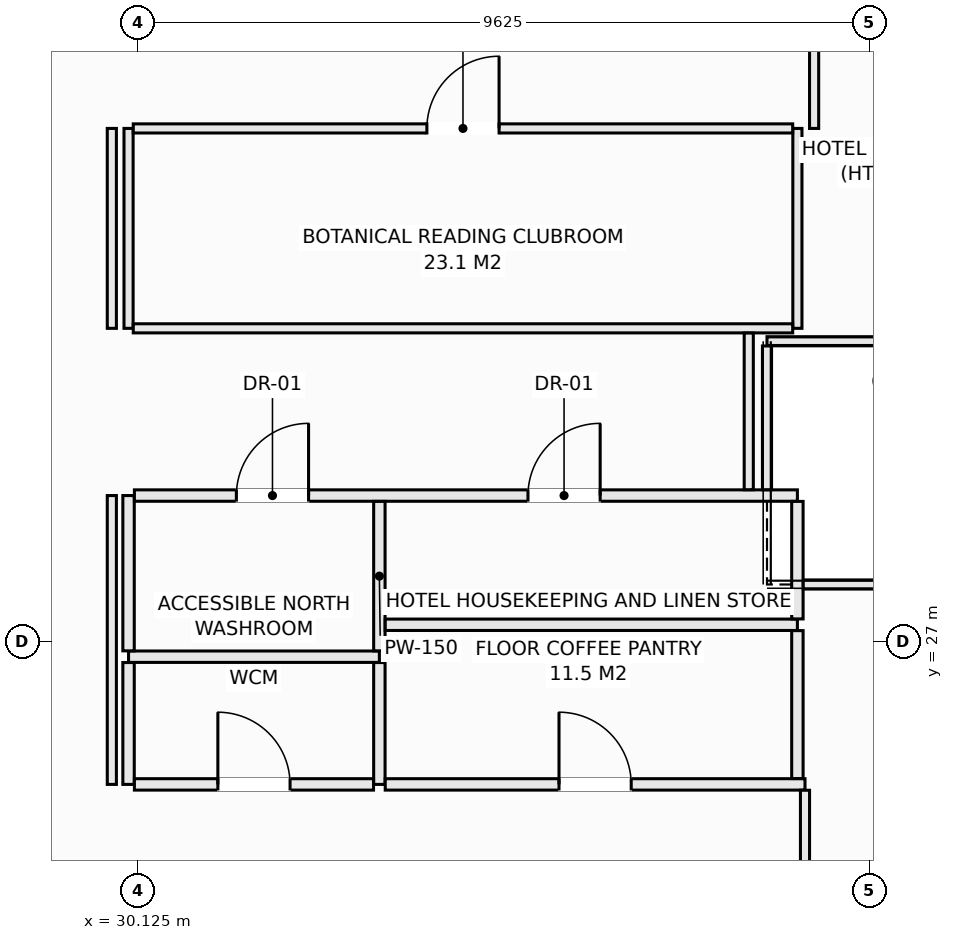
"""IFC4 building model, lengths in metres.
Left out: names, types, materials, properties, quantities, classifications, styles, units other than length and angle.
Written with IfcOpenShell. Run it as: python <this file> out.ifc"""

import sys

from ifc_helpers import new_model, si_unit, direction, frame, frame_2d, origin, place, context, subcontext, project, spatial, rectangle, extrude, element, fill, save


model = new_model("IFC4")
c1 = context("Model", 3, precision=1e-05, world=origin(), true_north=direction((0.0, 1.0)))
c2 = subcontext(c1, "Body", "Model", "MODEL_VIEW")
j1 = project(units=[si_unit("LENGTHUNIT", "METRE"), si_unit("PLANEANGLEUNIT", "RADIAN")], contexts=[c1])
p1 = place(None, origin())
s1 = spatial("IfcSite", under=j1, at=p1, CompositionType="ELEMENT")
p2 = place(p1, origin())
s2 = spatial("IfcBuilding", under=s1, at=p2, CompositionType="ELEMENT")
p3 = place(p2, frame((0.0, 0.0, 122.3)))
s3 = spatial("IfcBuildingStorey", under=s2, at=p3, CompositionType="ELEMENT", Elevation=122.3)
p4 = place(p3, frame((30.0, 26.8, 0.0), z_axis=(0.0, 0.0, 1.0), x_axis=(1.0, 0.0, 0.0)))
e1 = element("IfcWall", 1, at=p4, inside=s3, PredefinedType="PARTITIONING", context=c2, shape_type="SweptSolid", body=[
    extrude(rectangle(XDim=3.3, YDim=0.15, at=frame_2d((1.65, 0.0))), origin(), (0.0, 0.0, 1.0), 3.13),
])
p5 = place(p3, frame((30.0, 25.12, 0.0), z_axis=(0.0, 0.0, 1.0), x_axis=(0.0, 1.0, 0.0)))
e2 = element("IfcWall", 2, at=p5, inside=s3, PredefinedType="PARTITIONING", context=c2, shape_type="SweptSolid", body=[
    extrude(rectangle(XDim=1.603, YDim=0.15, at=frame_2d((0.801, 0.0))), origin(), (0.0, 0.0, 1.0), 3.13),
])
p6 = place(p3, frame((30.0, 26.877, 0.0), z_axis=(0.0, 0.0, 1.0), x_axis=(0.0, 1.0, 0.0)))
e3 = element("IfcWall", 3, at=p6, inside=s3, PredefinedType="PARTITIONING", context=c2, shape_type="SweptSolid", body=[
    extrude(rectangle(XDim=2.043, YDim=0.15, at=frame_2d((1.021, 0.0))), origin(), (0.0, 0.0, 1.0), 3.13),
])
p7 = place(p3, frame((30.0, 31.12, 0.0), z_axis=(0.0, 0.0, 1.0), x_axis=(0.0, 1.0, 0.0)))
e4 = element("IfcWall", 4, at=p7, inside=s3, PredefinedType="PARTITIONING", context=c2, shape_type="SweptSolid", body=[
    extrude(rectangle(XDim=2.63, YDim=0.12, at=frame_2d((1.315, 0.0))), origin(), (0.0, 0.0, 1.0), 3.13),
])
p8 = place(p3, frame((30.077, 28.92, 0.0), z_axis=(0.0, 0.0, 1.0), x_axis=(1.0, 0.0, 0.0)))
e5 = element("IfcWall", 5, at=p8, inside=s3, PredefinedType="PARTITIONING", context=c2, shape_type="SweptSolid", body=[
    extrude(rectangle(XDim=8.723, YDim=0.15, at=frame_2d((4.362, 0.0))), origin(), (0.0, 0.0, 1.0), 3.13),
])
p9 = place(p8, frame((1.342, 0.0, 0.0)))
e6 = element("IfcOpeningElement", 6, at=p9, cuts=e5, PredefinedType="OPENING", context=c2, shape_type="SweptSolid", body=[
    extrude(rectangle(XDim=0.95, YDim=2.1, at=frame_2d((0.475, 1.05))), frame((0.0, 0.085, 0.0), z_axis=(0.0, -1.0, 0.0), x_axis=(1.0, 0.0, 0.0)), (0.0, 0.0, 1.0), 0.17),
])
p10 = place(p8, frame((5.178, 0.0, 0.0)))
e7 = element("IfcOpeningElement", 7, at=p10, cuts=e5, PredefinedType="OPENING", context=c2, shape_type="SweptSolid", body=[
    extrude(rectangle(XDim=0.95, YDim=2.1, at=frame_2d((0.475, 1.05))), frame((0.0, 0.085, 0.0), z_axis=(0.0, -1.0, 0.0), x_axis=(1.0, 0.0, 0.0)), (0.0, 0.0, 1.0), 0.17),
])
p11 = place(p3, frame((33.3, 25.12, 0.0), z_axis=(0.0, 0.0, 1.0), x_axis=(0.0, 1.0, 0.0)))
e8 = element("IfcWall", 8, at=p11, inside=s3, PredefinedType="PARTITIONING", context=c2, shape_type="SweptSolid", body=[
    extrude(rectangle(XDim=1.603, YDim=0.15, at=frame_2d((0.801, 0.0))), origin(), (0.0, 0.0, 1.0), 3.13),
])
p12 = place(p3, frame((33.3, 26.877, 0.0), z_axis=(0.0, 0.0, 1.0), x_axis=(0.0, 1.0, 0.0)))
e9 = element("IfcWall", 9, at=p12, inside=s3, PredefinedType="PARTITIONING", context=c2, shape_type="SweptSolid", body=[
    extrude(rectangle(XDim=1.966, YDim=0.15, at=frame_2d((0.983, 0.0))), origin(), (0.0, 0.0, 1.0), 3.13),
])
p13 = place(p3, frame((30.077, 25.12, 0.0), z_axis=(0.0, 0.0, 1.0), x_axis=(1.0, 0.0, 0.0)))
e10 = element("IfcWall", 10, at=p13, inside=s3, PredefinedType="PARTITIONING", context=c2, shape_type="SweptSolid", body=[
    extrude(rectangle(XDim=3.146, YDim=0.15, at=frame_2d((1.573, 0.0))), origin(), (0.0, 0.0, 1.0), 3.13),
])
p14 = place(p13, frame((1.098, 0.0, 0.0)))
e11 = element("IfcOpeningElement", 11, at=p14, cuts=e10, PredefinedType="OPENING", context=c2, shape_type="SweptSolid", body=[
    extrude(rectangle(XDim=0.95, YDim=2.1, at=frame_2d((0.475, 1.05))), frame((0.0, 0.085, 0.0), z_axis=(0.0, -1.0, 0.0), x_axis=(1.0, 0.0, 0.0)), (0.0, 0.0, 1.0), 0.17),
])
p15 = place(p3, frame((33.377, 25.12, 0.0), z_axis=(0.0, 0.0, 1.0), x_axis=(1.0, 0.0, 0.0)))
e12 = element("IfcWall", 12, at=p15, inside=s3, PredefinedType="PARTITIONING", context=c2, shape_type="SweptSolid", body=[
    extrude(rectangle(XDim=5.523, YDim=0.15, at=frame_2d((2.761, 0.0))), origin(), (0.0, 0.0, 1.0), 3.13),
])
p16 = place(p15, frame((2.287, 0.0, 0.0)))
e13 = element("IfcOpeningElement", 13, at=p16, cuts=e12, PredefinedType="OPENING", context=c2, shape_type="SweptSolid", body=[
    extrude(rectangle(XDim=0.95, YDim=2.1, at=frame_2d((0.475, 1.05))), frame((0.0, 0.085, 0.0), z_axis=(0.0, -1.0, 0.0), x_axis=(1.0, 0.0, 0.0)), (0.0, 0.0, 1.0), 0.17),
])
p17 = place(p3, frame((33.377, 27.22, 0.0), z_axis=(0.0, 0.0, 1.0), x_axis=(1.0, 0.0, 0.0)))
e14 = element("IfcWall", 14, at=p17, inside=s3, PredefinedType="PARTITIONING", context=c2, shape_type="SweptSolid", body=[
    extrude(rectangle(XDim=5.423, YDim=0.15, at=frame_2d((2.711, 0.0))), origin(), (0.0, 0.0, 1.0), 3.13),
])
p18 = place(p3, frame((38.8, 25.197, 0.0), z_axis=(0.0, 0.0, 1.0), x_axis=(0.0, 1.0, 0.0)))
e15 = element("IfcWall", 15, at=p18, inside=s3, PredefinedType="PARTITIONING", context=c2, shape_type="SweptSolid", body=[
    extrude(rectangle(XDim=1.946, YDim=0.15, at=frame_2d((0.973, 0.0))), origin(), (0.0, 0.0, 1.0), 3.13),
])
p19 = place(p3, frame((38.8, 27.297, 0.0), z_axis=(0.0, 0.0, 1.0), x_axis=(0.0, 1.0, 0.0)))
e16 = element("IfcWall", 16, at=p19, inside=s3, PredefinedType="PARTITIONING", context=c2, shape_type="SweptSolid", body=[
    extrude(rectangle(XDim=1.546, YDim=0.15, at=frame_2d((0.773, 0.0))), origin(), (0.0, 0.0, 1.0), 3.13),
])
p20 = place(p3, frame((38.8, 31.12, 0.0), z_axis=(0.0, 0.0, 1.0), x_axis=(0.0, 1.0, 0.0)))
e17 = element("IfcWall", 17, at=p20, inside=s3, PredefinedType="PARTITIONING", context=c2, shape_type="SweptSolid", body=[
    extrude(rectangle(XDim=2.63, YDim=0.12, at=frame_2d((1.315, 0.0))), origin(), (0.0, 0.0, 1.0), 3.13),
])
p21 = place(p3, frame((30.062, 31.12, 0.0), z_axis=(0.0, 0.0, 1.0), x_axis=(1.0, 0.0, 0.0)))
e18 = element("IfcWall", 18, at=p21, inside=s3, PredefinedType="PARTITIONING", context=c2, shape_type="SweptSolid", body=[
    extrude(rectangle(XDim=8.676, YDim=0.12, at=frame_2d((4.338, 0.0))), origin(), (0.0, 0.0, 1.0), 3.13),
])
p22 = place(p3, frame((30.062, 33.75, 0.0), z_axis=(0.0, 0.0, 1.0), x_axis=(1.0, 0.0, 0.0)))
e19 = element("IfcWall", 19, at=p22, inside=s3, PredefinedType="PARTITIONING", context=c2, shape_type="SweptSolid", body=[
    extrude(rectangle(XDim=8.676, YDim=0.12, at=frame_2d((4.338, 0.0))), origin(), (0.0, 0.0, 1.0), 3.13),
])
p23 = place(p22, frame((3.863, 0.0, 0.0)))
e20 = element("IfcOpeningElement", 20, at=p23, cuts=e19, PredefinedType="OPENING", context=c2, shape_type="SweptSolid", body=[
    extrude(rectangle(XDim=0.95, YDim=2.1, at=frame_2d((0.475, 1.05))), frame((0.0, 0.07, 0.0), z_axis=(0.0, -1.0, 0.0), x_axis=(1.0, 0.0, 0.0)), (0.0, 0.0, 1.0), 0.14),
])
p24 = place(p3, frame((39.02, 33.75, 0.0), z_axis=(0.0, 0.0, 1.0), x_axis=(0.0, 1.0, 0.0)))
e21 = element("IfcWall", 21, at=p24, inside=s3, PredefinedType="PARTITIONING", context=c2, shape_type="SweptSolid", body=[
    extrude(rectangle(XDim=2.0, YDim=0.12, at=frame_2d((1.0, 0.0))), origin(), (0.0, 0.0, 1.0), 3.13),
])
p25 = place(p3, frame((29.78, 25.12, 0.0), z_axis=(0.0, 0.0, 1.0), x_axis=(0.0, 1.0, 0.0)))
e22 = element("IfcWall", 22, at=p25, inside=s3, PredefinedType="PARTITIONING", context=c2, shape_type="SweptSolid", body=[
    extrude(rectangle(XDim=3.8, YDim=0.12, at=frame_2d((1.9, 0.0))), origin(), (0.0, 0.0, 1.0), 3.13),
])
p26 = place(p3, frame((29.78, 31.12, 0.0), z_axis=(0.0, 0.0, 1.0), x_axis=(0.0, 1.0, 0.0)))
e23 = element("IfcWall", 23, at=p26, inside=s3, PredefinedType="PARTITIONING", context=c2, shape_type="SweptSolid", body=[
    extrude(rectangle(XDim=2.63, YDim=0.12, at=frame_2d((1.315, 0.0))), origin(), (0.0, 0.0, 1.0), 3.13),
])
p27 = place(p3, frame((38.16, 28.997, 0.0), z_axis=(0.0, 0.0, 1.0), x_axis=(0.0, 1.0, 0.0)))
e24 = element("IfcWall", 24, at=p27, inside=s3, PredefinedType="PARTITIONING", context=c2, shape_type="SweptSolid", body=[
    extrude(rectangle(XDim=2.061, YDim=0.12, at=frame_2d((1.031, 0.0))), origin(), (0.0, 0.0, 1.0), 3.13),
])
p28 = place(p3, frame((38.9, 23.02, 0.0), z_axis=(0.0, 0.0, 1.0), x_axis=(0.0, 1.0, 0.0)))
e25 = element("IfcWall", 25, at=p28, inside=s3, PredefinedType="PARTITIONING", context=c2, shape_type="SweptSolid", body=[
    extrude(rectangle(XDim=2.023, YDim=0.12, at=frame_2d((1.011, 0.0))), origin(), (0.0, 0.0, 1.0), 3.13),
])
p29 = place(p3, frame((38.877, 27.75, 0.0), z_axis=(0.0, 0.0, 1.0), x_axis=(1.0, 0.0, 0.0)))
e26 = element("IfcWall", 26, at=p29, inside=s3, PredefinedType="PARTITIONING", context=c2, shape_type="SweptSolid", body=[
    extrude(rectangle(XDim=4.923, YDim=0.12, at=frame_2d((2.461, 0.0))), origin(), (0.0, 0.0, 1.0), 3.13),
])
p30 = place(p3, frame((36.468, 40.488, 0.0), z_axis=(0.0, 0.0, 1.0), x_axis=(0.600219452556, -0.799835363543, 0.0)))
e27 = element("IfcWall", 27, at=p30, inside=s3, PredefinedType="PARTITIONING", context=c2, shape_type="SweptSolid", body=[
    extrude(rectangle(XDim=11.925, YDim=0.15, at=frame_2d((5.962, 0.0))), origin(), (0.0, 0.0, 1.0), 3.13),
])
p31 = place(p3, frame((38.4, 30.95, 0.0), z_axis=(0.0, 0.0, 1.0), x_axis=(1.0, 0.0, 0.0)))
e28 = element("IfcWall", 28, at=p31, inside=s3, PredefinedType="PARTITIONING", context=c2, shape_type="SweptSolid", body=[
    extrude(rectangle(XDim=5.129, YDim=0.12, at=frame_2d((2.564, 0.0))), origin(), (0.0, 0.0, 1.0), 3.13),
])
p32 = place(p3, frame((38.4, 28.997, 0.0), z_axis=(0.0, 0.0, 1.0), x_axis=(0.0, 1.0, 0.0)))
e29 = element("IfcWall", 29, at=p32, inside=s3, PredefinedType="PARTITIONING", context=c2, shape_type="SweptSolid", body=[
    extrude(rectangle(XDim=1.891, YDim=0.12, at=frame_2d((0.945, 0.0))), origin(), (0.0, 0.0, 1.0), 3.13),
])
p33 = place(p9, origin())
e30 = element("IfcDoor", 30, at=p33, inside=s3, OperationType="SINGLE_SWING_RIGHT", PredefinedType="DOOR", context=c2, shape_type="SweptSolid", body=[
    extrude(rectangle(XDim=0.95, YDim=2.1, at=frame_2d((0.475, 1.05))), frame((0.0, 0.025, 0.0), z_axis=(0.0, -1.0, 0.0), x_axis=(1.0, 0.0, 0.0)), (0.0, 0.0, 1.0), 0.05),
])
fill(e6, e30)
p34 = place(p14, origin())
e31 = element("IfcDoor", 31, at=p34, inside=s3, OperationType="SINGLE_SWING_LEFT", PredefinedType="DOOR", context=c2, shape_type="SweptSolid", body=[
    extrude(rectangle(XDim=0.95, YDim=2.1, at=frame_2d((0.475, 1.05))), frame((0.0, 0.025, 0.0), z_axis=(0.0, -1.0, 0.0), x_axis=(1.0, 0.0, 0.0)), (0.0, 0.0, 1.0), 0.05),
])
fill(e11, e31)
p35 = place(p10, origin())
e32 = element("IfcDoor", 32, at=p35, inside=s3, OperationType="SINGLE_SWING_RIGHT", PredefinedType="DOOR", context=c2, shape_type="SweptSolid", body=[
    extrude(rectangle(XDim=0.95, YDim=2.1, at=frame_2d((0.475, 1.05))), frame((0.0, 0.025, 0.0), z_axis=(0.0, -1.0, 0.0), x_axis=(1.0, 0.0, 0.0)), (0.0, 0.0, 1.0), 0.05),
])
fill(e7, e32)
p36 = place(p16, origin())
e33 = element("IfcDoor", 33, at=p36, inside=s3, OperationType="SINGLE_SWING_LEFT", PredefinedType="DOOR", context=c2, shape_type="SweptSolid", body=[
    extrude(rectangle(XDim=0.95, YDim=2.1, at=frame_2d((0.475, 1.05))), frame((0.0, 0.025, 0.0), z_axis=(0.0, -1.0, 0.0), x_axis=(1.0, 0.0, 0.0)), (0.0, 0.0, 1.0), 0.05),
])
fill(e13, e33)
p37 = place(p23, origin())
e34 = element("IfcDoor", 34, at=p37, inside=s3, OperationType="SINGLE_SWING_RIGHT", PredefinedType="DOOR", context=c2, shape_type="SweptSolid", body=[
    extrude(rectangle(XDim=0.95, YDim=2.1, at=frame_2d((0.475, 1.05))), frame((0.0, 0.025, 0.0), z_axis=(0.0, -1.0, 0.0), x_axis=(1.0, 0.0, 0.0)), (0.0, 0.0, 1.0), 0.05),
])
fill(e20, e34)
save(model, sys.argv[1])
